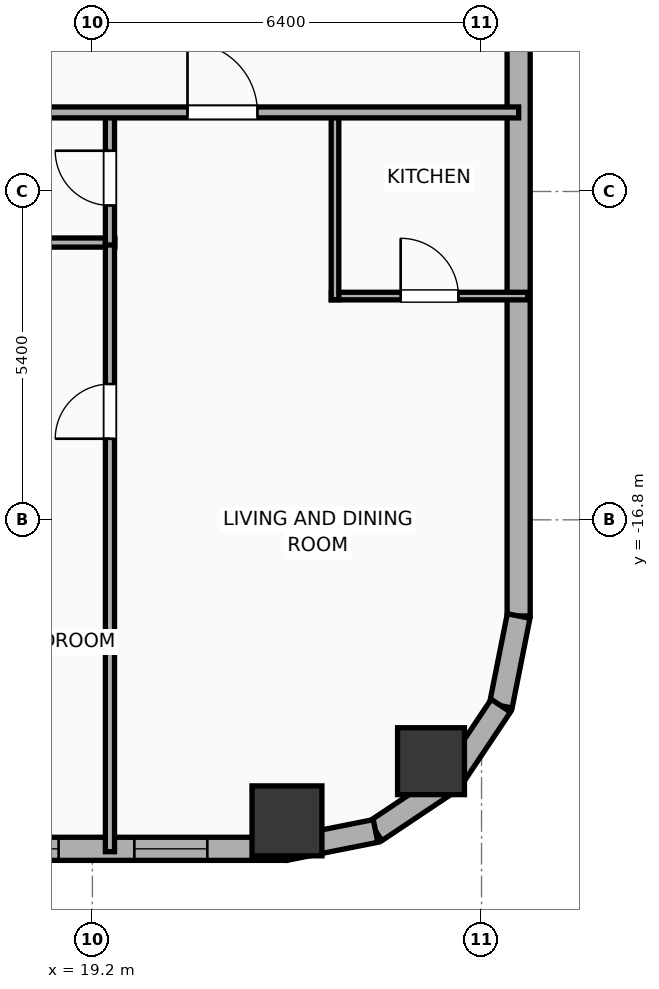
"""IFC4 building model, lengths in metres.
Left out: names, types, materials, properties, quantities, classifications, styles, units other than length and angle.
Written with IfcOpenShell. Run it as: python <this file> out.ifc"""

import sys

from ifc_helpers import new_model, si_unit, direction, frame, frame_2d, origin, origin_2d, place, context, subcontext, project, spatial, rectangle, hollow_rectangle, hollow_circle, extrude, element, fill, save


model = new_model("IFC4")
c1 = context("Model", 3, precision=1e-05, world=origin(), true_north=direction((0.0, 1.0)))
c2 = subcontext(c1, "Body", "Model", "MODEL_VIEW")
j1 = project(units=[si_unit("LENGTHUNIT", "METRE"), si_unit("PLANEANGLEUNIT", "RADIAN")], contexts=[c1])
p1 = place(None, origin())
s1 = spatial("IfcSite", under=j1, at=p1, CompositionType="ELEMENT")
p2 = place(p1, origin())
s2 = spatial("IfcBuilding", under=s1, at=p2, CompositionType="ELEMENT")
p3 = place(p2, frame((0.0, 0.0, 41.6)))
s3 = spatial("IfcBuildingStorey", under=s2, at=p3, CompositionType="ELEMENT", Elevation=41.6)
p4 = place(p3, frame((22.4, -21.75, 0.0), z_axis=(0.0, 0.0, 1.0), x_axis=(1.0, 0.0, 0.0)))
e1 = element("IfcColumn", 1, at=p4, inside=s3, PredefinedType="COLUMN", context=c2, shape_type="SweptSolid", body=[
    extrude(hollow_rectangle(XDim=1.15, YDim=1.15, WallThickness=0.04, at=origin_2d()), origin(), (0.0, 0.0, 1.0), 3.9),
])
p5 = place(p3, frame((24.769, -20.769, 0.0), z_axis=(0.0, 0.0, 1.0), x_axis=(1.0, 0.0, 0.0)))
e2 = element("IfcColumn", 2, at=p5, inside=s3, PredefinedType="COLUMN", context=c2, shape_type="SweptSolid", body=[
    extrude(hollow_circle(Radius=0.55, WallThickness=0.036, at=origin_2d()), origin(), (0.0, 0.0, 1.0), 3.9),
])
p6 = place(p3, frame((22.381, -22.21, 0.0), z_axis=(0.0, 0.0, 1.0), x_axis=(-1.0, 0.0, 0.0)))
e3 = element("IfcWall", 3, at=p6, inside=s3, PredefinedType="ELEMENTEDWALL", context=c2, shape_type="SweptSolid", body=[
    extrude(rectangle(XDim=51.963, YDim=0.38, at=frame_2d((25.981, 0.0))), origin(), (0.0, 0.0, 1.0), 3.65),
])
p7 = place(p6, frame((42.952, 0.0, 0.75)))
e4 = element("IfcOpeningElement", 4, at=p7, cuts=e3, PredefinedType="OPENING", context=c2, shape_type="SweptSolid", body=[
    extrude(rectangle(XDim=2.4, YDim=2.1, at=frame_2d((1.2, 1.05))), frame((0.0, 0.2, 0.0), z_axis=(0.0, -1.0, 0.0), x_axis=(1.0, 0.0, 0.0)), (0.0, 0.0, 1.0), 0.4),
])
p8 = place(p6, frame((49.847, 0.0, 0.75)))
e5 = element("IfcOpeningElement", 5, at=p8, cuts=e3, PredefinedType="OPENING", context=c2, shape_type="SweptSolid", body=[
    extrude(rectangle(XDim=1.2, YDim=2.05, at=frame_2d((0.6, 1.025))), frame((0.0, 0.2, 0.0), z_axis=(0.0, -1.0, 0.0), x_axis=(1.0, 0.0, 0.0)), (0.0, 0.0, 1.0), 0.4),
])
p9 = place(p6, frame((47.445, 0.0, 0.75)))
e6 = element("IfcOpeningElement", 6, at=p9, cuts=e3, PredefinedType="OPENING", context=c2, shape_type="SweptSolid", body=[
    extrude(rectangle(XDim=1.2, YDim=2.05, at=frame_2d((0.6, 1.025))), frame((0.0, 0.2, 0.0), z_axis=(0.0, -1.0, 0.0), x_axis=(1.0, 0.0, 0.0)), (0.0, 0.0, 1.0), 0.4),
])
p10 = place(p6, frame((39.526, 0.0, 0.75)))
e7 = element("IfcOpeningElement", 7, at=p10, cuts=e3, PredefinedType="OPENING", context=c2, shape_type="SweptSolid", body=[
    extrude(rectangle(XDim=1.2, YDim=2.05, at=frame_2d((0.6, 1.025))), frame((0.0, 0.2, 0.0), z_axis=(0.0, -1.0, 0.0), x_axis=(1.0, 0.0, 0.0)), (0.0, 0.0, 1.0), 0.4),
])
p11 = place(p6, frame((33.018, 0.0, 0.75)))
e8 = element("IfcOpeningElement", 8, at=p11, cuts=e3, PredefinedType="OPENING", context=c2, shape_type="SweptSolid", body=[
    extrude(rectangle(XDim=1.2, YDim=2.05, at=frame_2d((0.6, 1.025))), frame((0.0, 0.2, 0.0), z_axis=(0.0, -1.0, 0.0), x_axis=(1.0, 0.0, 0.0)), (0.0, 0.0, 1.0), 0.4),
])
p12 = place(p6, frame((36.813, 0.0, 0.75)))
e9 = element("IfcOpeningElement", 9, at=p12, cuts=e3, PredefinedType="OPENING", context=c2, shape_type="SweptSolid", body=[
    extrude(rectangle(XDim=1.2, YDim=2.05, at=frame_2d((0.6, 1.025))), frame((0.0, 0.2, 0.0), z_axis=(0.0, -1.0, 0.0), x_axis=(1.0, 0.0, 0.0)), (0.0, 0.0, 1.0), 0.4),
])
p13 = place(p6, frame((28.886, 0.0, 0.75)))
e10 = element("IfcOpeningElement", 10, at=p13, cuts=e3, PredefinedType="OPENING", context=c2, shape_type="SweptSolid", body=[
    extrude(rectangle(XDim=1.2, YDim=2.05, at=frame_2d((0.6, 1.025))), frame((0.0, 0.2, 0.0), z_axis=(0.0, -1.0, 0.0), x_axis=(1.0, 0.0, 0.0)), (0.0, 0.0, 1.0), 0.4),
])
p14 = place(p6, frame((23.306, 0.0, 0.75)))
e11 = element("IfcOpeningElement", 11, at=p14, cuts=e3, PredefinedType="OPENING", context=c2, shape_type="SweptSolid", body=[
    extrude(rectangle(XDim=1.2, YDim=2.05, at=frame_2d((0.6, 1.025))), frame((0.0, 0.2, 0.0), z_axis=(0.0, -1.0, 0.0), x_axis=(1.0, 0.0, 0.0)), (0.0, 0.0, 1.0), 0.4),
])
p15 = place(p6, frame((26.056, 0.0, 0.75)))
e12 = element("IfcOpeningElement", 12, at=p15, cuts=e3, PredefinedType="OPENING", context=c2, shape_type="SweptSolid", body=[
    extrude(rectangle(XDim=1.2, YDim=2.05, at=frame_2d((0.6, 1.025))), frame((0.0, 0.2, 0.0), z_axis=(0.0, -1.0, 0.0), x_axis=(1.0, 0.0, 0.0)), (0.0, 0.0, 1.0), 0.4),
])
p16 = place(p6, frame((18.811, 0.0, 0.75)))
e13 = element("IfcOpeningElement", 13, at=p16, cuts=e3, PredefinedType="OPENING", context=c2, shape_type="SweptSolid", body=[
    extrude(rectangle(XDim=1.2, YDim=2.05, at=frame_2d((0.6, 1.025))), frame((0.0, 0.2, 0.0), z_axis=(0.0, -1.0, 0.0), x_axis=(1.0, 0.0, 0.0)), (0.0, 0.0, 1.0), 0.4),
])
p17 = place(p6, frame((14.602, 0.0, 0.75)))
e14 = element("IfcOpeningElement", 14, at=p17, cuts=e3, PredefinedType="OPENING", context=c2, shape_type="SweptSolid", body=[
    extrude(rectangle(XDim=1.2, YDim=2.05, at=frame_2d((0.6, 1.025))), frame((0.0, 0.2, 0.0), z_axis=(0.0, -1.0, 0.0), x_axis=(1.0, 0.0, 0.0)), (0.0, 0.0, 1.0), 0.4),
])
p18 = place(p6, frame((11.852, 0.0, 0.75)))
e15 = element("IfcOpeningElement", 15, at=p18, cuts=e3, PredefinedType="OPENING", context=c2, shape_type="SweptSolid", body=[
    extrude(rectangle(XDim=1.2, YDim=2.05, at=frame_2d((0.6, 1.025))), frame((0.0, 0.2, 0.0), z_axis=(0.0, -1.0, 0.0), x_axis=(1.0, 0.0, 0.0)), (0.0, 0.0, 1.0), 0.4),
])
p19 = place(p6, frame((8.316, 0.0, 0.75)))
e16 = element("IfcOpeningElement", 16, at=p19, cuts=e3, PredefinedType="OPENING", context=c2, shape_type="SweptSolid", body=[
    extrude(rectangle(XDim=1.2, YDim=2.05, at=frame_2d((0.6, 1.025))), frame((0.0, 0.2, 0.0), z_axis=(0.0, -1.0, 0.0), x_axis=(1.0, 0.0, 0.0)), (0.0, 0.0, 1.0), 0.4),
])
p20 = place(p6, frame((6.286, 0.0, 0.75)))
e17 = element("IfcOpeningElement", 17, at=p20, cuts=e3, PredefinedType="OPENING", context=c2, shape_type="SweptSolid", body=[
    extrude(rectangle(XDim=1.2, YDim=2.05, at=frame_2d((0.6, 1.025))), frame((0.0, 0.2, 0.0), z_axis=(0.0, -1.0, 0.0), x_axis=(1.0, 0.0, 0.0)), (0.0, 0.0, 1.0), 0.4),
])
p21 = place(p6, frame((3.737, 0.0, 0.75)))
e18 = element("IfcOpeningElement", 18, at=p21, cuts=e3, PredefinedType="OPENING", context=c2, shape_type="SweptSolid", body=[
    extrude(rectangle(XDim=1.2, YDim=2.05, at=frame_2d((0.6, 1.025))), frame((0.0, 0.2, 0.0), z_axis=(0.0, -1.0, 0.0), x_axis=(1.0, 0.0, 0.0)), (0.0, 0.0, 1.0), 0.4),
])
p22 = place(p6, frame((1.291, 0.0, 0.75)))
e19 = element("IfcOpeningElement", 19, at=p22, cuts=e3, PredefinedType="OPENING", context=c2, shape_type="SweptSolid", body=[
    extrude(rectangle(XDim=1.2, YDim=2.05, at=frame_2d((0.6, 1.025))), frame((0.0, 0.2, 0.0), z_axis=(0.0, -1.0, 0.0), x_axis=(1.0, 0.0, 0.0)), (0.0, 0.0, 1.0), 0.4),
])
p23 = place(p3, frame((26.21, 18.381, 0.0), z_axis=(0.0, 0.0, 1.0), x_axis=(0.0, -1.0, 0.0)))
e20 = element("IfcWall", 20, at=p23, inside=s3, PredefinedType="ELEMENTEDWALL", context=c2, shape_type="SweptSolid", body=[
    extrude(rectangle(XDim=36.763, YDim=0.38, at=frame_2d((18.381, 0.0))), origin(), (0.0, 0.0, 1.0), 3.65),
])
p24 = place(p3, frame((26.21, -18.381, 0.0), z_axis=(0.0, 0.0, 1.0), x_axis=(-0.195086038585, -0.980786132421, 0.0)))
e21 = element("IfcWall", 21, at=p24, inside=s3, PredefinedType="ELEMENTEDWALL", context=c2, shape_type="SweptSolid", body=[
    extrude(rectangle(XDim=1.504, YDim=0.38, at=frame_2d((0.752, 0.0))), origin(), (0.0, 0.0, 1.0), 3.65),
])
for number, where, z_axis, x_axis in (
    (22, (25.917, -19.857, 0.0), (0.0, 0.0, 1.0), (-0.556, -0.831, 0.0)),
    (23, (25.091, -21.091, 0.0), (0.0, 0.0, 1.0), (-0.831, -0.556, 0.0)),
):
    element("IfcWall", number, at=place(p3, frame(where, z_axis=z_axis, x_axis=x_axis)), inside=s3, PredefinedType="ELEMENTEDWALL", context=c2, shape_type="SweptSolid", body=[
        extrude(rectangle(XDim=1.485, YDim=0.38, at=frame_2d((0.743, 0.0))), origin(), (0.0, 0.0, 1.0), 3.65),
    ])
p25 = place(p3, frame((23.857, -21.917, 0.0), z_axis=(0.0, 0.0, 1.0), x_axis=(-0.980786132421, -0.195086038585, 0.0)))
e24 = element("IfcWall", 24, at=p25, inside=s3, PredefinedType="ELEMENTEDWALL", context=c2, shape_type="SweptSolid", body=[
    extrude(rectangle(XDim=1.504, YDim=0.38, at=frame_2d((0.752, 0.0))), origin(), (0.0, 0.0, 1.0), 3.65),
])
p26 = place(p3, frame((16.34, -12.24, 0.0), z_axis=(0.0, 0.0, 1.0), x_axis=(1.0, 0.0, 0.0)))
e25 = element("IfcWall", 25, at=p26, inside=s3, PredefinedType="PLUMBINGWALL", context=c2, shape_type="SweptSolid", body=[
    extrude(rectangle(XDim=3.229, YDim=0.15, at=frame_2d((1.615, 0.0))), origin(), (0.0, 0.0, 1.0), 3.65),
])
p27 = place(p3, frame((19.489, -22.258, 0.0), z_axis=(0.0, 0.0, 1.0), x_axis=(0.0, 1.0, 0.0)))
e26 = element("IfcWall", 26, at=p27, inside=s3, PredefinedType="PLUMBINGWALL", context=c2, shape_type="SweptSolid", body=[
    extrude(rectangle(XDim=10.058, YDim=0.15, at=frame_2d((5.029, 0.0))), origin(), (0.0, 0.0, 1.0), 3.65),
])
p28 = place(p27, frame((6.792, 0.0, 0.0)))
e27 = element("IfcOpeningElement", 27, at=p28, cuts=e26, PredefinedType="OPENING", context=c2, shape_type="SweptSolid", body=[
    extrude(rectangle(XDim=0.9, YDim=2.05, at=frame_2d((0.45, 1.025))), frame((0.0, 0.085, 0.0), z_axis=(0.0, -1.0, 0.0), x_axis=(1.0, 0.0, 0.0)), (0.0, 0.0, 1.0), 0.17),
])
p29 = place(p3, frame((19.489, -12.28, 0.0), z_axis=(0.0, 0.0, 1.0), x_axis=(0.0, 1.0, 0.0)))
e28 = element("IfcWall", 28, at=p29, inside=s3, PredefinedType="PLUMBINGWALL", context=c2, shape_type="SweptSolid", body=[
    extrude(rectangle(XDim=2.2, YDim=0.15, at=frame_2d((1.1, 0.0))), origin(), (0.0, 0.0, 1.0), 3.65),
])
p30 = place(p29, frame((0.65, 0.0, 0.0)))
e29 = element("IfcOpeningElement", 29, at=p30, cuts=e28, PredefinedType="OPENING", context=c2, shape_type="SweptSolid", body=[
    extrude(rectangle(XDim=0.9, YDim=2.05, at=frame_2d((0.45, 1.025))), frame((0.0, 0.085, 0.0), z_axis=(0.0, -1.0, 0.0), x_axis=(1.0, 0.0, 0.0)), (0.0, 0.0, 1.0), 0.17),
])
p31 = place(p3, frame((23.13, -13.12, 0.0), z_axis=(0.0, 0.0, 1.0), x_axis=(1.0, 0.0, 0.0)))
e30 = element("IfcWall", 30, at=p31, inside=s3, PredefinedType="PARTITIONING", context=c2, shape_type="SweptSolid", body=[
    extrude(rectangle(XDim=3.23, YDim=0.125, at=frame_2d((1.615, 0.0))), origin(), (0.0, 0.0, 1.0), 3.65),
])
p32 = place(p31, frame((1.14, 0.0, 0.0)))
e31 = element("IfcOpeningElement", 31, at=p32, cuts=e30, PredefinedType="OPENING", context=c2, shape_type="SweptSolid", body=[
    extrude(rectangle(XDim=0.95, YDim=2.05, at=frame_2d((0.475, 1.025))), frame((0.0, 0.073, 0.0), z_axis=(0.0, -1.0, 0.0), x_axis=(1.0, 0.0, 0.0)), (0.0, 0.0, 1.0), 0.145),
])
p33 = place(p3, frame((23.19, -13.18, 0.0), z_axis=(0.0, 0.0, 1.0), x_axis=(0.0, 1.0, 0.0)))
e32 = element("IfcWall", 32, at=p33, inside=s3, PredefinedType="PARTITIONING", context=c2, shape_type="SweptSolid", body=[
    extrude(rectangle(XDim=3.1, YDim=0.125, at=frame_2d((1.55, 0.0))), origin(), (0.0, 0.0, 1.0), 3.65),
])
p34 = place(p3, frame((-33.41, -10.1, 0.0), z_axis=(0.0, 0.0, 1.0), x_axis=(1.0, 0.0, 0.0)))
e33 = element("IfcWall", 33, at=p34, inside=s3, PredefinedType="PARTITIONING", context=c2, shape_type="SweptSolid", body=[
    extrude(rectangle(XDim=59.62, YDim=0.18, at=frame_2d((29.81, 0.0))), origin(), (0.0, 0.0, 1.0), 3.65),
])
p35 = place(p34, frame((2.746, 0.0, 0.0)))
e34 = element("IfcOpeningElement", 34, at=p35, cuts=e33, PredefinedType="OPENING", context=c2, shape_type="SweptSolid", body=[
    extrude(rectangle(XDim=0.9, YDim=2.05, at=frame_2d((0.45, 1.025))), frame((0.0, 0.1, 0.0), z_axis=(0.0, -1.0, 0.0), x_axis=(1.0, 0.0, 0.0)), (0.0, 0.0, 1.0), 0.2),
])
p36 = place(p34, frame((11.552, 0.0, 0.0)))
e35 = element("IfcOpeningElement", 35, at=p36, cuts=e33, PredefinedType="OPENING", context=c2, shape_type="SweptSolid", body=[
    extrude(rectangle(XDim=1.15, YDim=2.05, at=frame_2d((0.575, 1.025))), frame((0.0, 0.1, 0.0), z_axis=(0.0, -1.0, 0.0), x_axis=(1.0, 0.0, 0.0)), (0.0, 0.0, 1.0), 0.2),
])
p37 = place(p34, frame((22.379, 0.0, 0.0)))
e36 = element("IfcOpeningElement", 36, at=p37, cuts=e33, PredefinedType="OPENING", context=c2, shape_type="SweptSolid", body=[
    extrude(rectangle(XDim=1.15, YDim=2.05, at=frame_2d((0.575, 1.025))), frame((0.0, 0.1, 0.0), z_axis=(0.0, -1.0, 0.0), x_axis=(1.0, 0.0, 0.0)), (0.0, 0.0, 1.0), 0.2),
])
p38 = place(p34, frame((31.28, 0.0, 0.0)))
e37 = element("IfcOpeningElement", 37, at=p38, cuts=e33, PredefinedType="OPENING", context=c2, shape_type="SweptSolid", body=[
    extrude(rectangle(XDim=1.15, YDim=2.05, at=frame_2d((0.575, 1.025))), frame((0.0, 0.1, 0.0), z_axis=(0.0, -1.0, 0.0), x_axis=(1.0, 0.0, 0.0)), (0.0, 0.0, 1.0), 0.2),
])
p39 = place(p34, frame((36.02, 0.0, 0.0)))
e38 = element("IfcOpeningElement", 38, at=p39, cuts=e33, PredefinedType="OPENING", context=c2, shape_type="SweptSolid", body=[
    extrude(rectangle(XDim=0.9, YDim=2.05, at=frame_2d((0.45, 1.025))), frame((0.0, 0.1, 0.0), z_axis=(0.0, -1.0, 0.0), x_axis=(1.0, 0.0, 0.0)), (0.0, 0.0, 1.0), 0.2),
])
p40 = place(p34, frame((40.044, 0.0, 0.0)))
e39 = element("IfcOpeningElement", 39, at=p40, cuts=e33, PredefinedType="OPENING", context=c2, shape_type="SweptSolid", body=[
    extrude(rectangle(XDim=1.15, YDim=2.05, at=frame_2d((0.575, 1.025))), frame((0.0, 0.1, 0.0), z_axis=(0.0, -1.0, 0.0), x_axis=(1.0, 0.0, 0.0)), (0.0, 0.0, 1.0), 0.2),
])
p41 = place(p34, frame((45.613, 0.0, 0.0)))
e40 = element("IfcOpeningElement", 40, at=p41, cuts=e33, PredefinedType="OPENING", context=c2, shape_type="SweptSolid", body=[
    extrude(rectangle(XDim=1.15, YDim=2.05, at=frame_2d((0.575, 1.025))), frame((0.0, 0.1, 0.0), z_axis=(0.0, -1.0, 0.0), x_axis=(1.0, 0.0, 0.0)), (0.0, 0.0, 1.0), 0.2),
])
p42 = place(p34, frame((54.174, 0.0, 0.0)))
e41 = element("IfcOpeningElement", 41, at=p42, cuts=e33, PredefinedType="OPENING", context=c2, shape_type="SweptSolid", body=[
    extrude(rectangle(XDim=1.15, YDim=2.05, at=frame_2d((0.575, 1.025))), frame((0.0, 0.1, 0.0), z_axis=(0.0, -1.0, 0.0), x_axis=(1.0, 0.0, 0.0)), (0.0, 0.0, 1.0), 0.2),
])
p43 = place(p21, origin())
e42 = element("IfcWindow", 42, at=p43, inside=s3, PartitioningType="SINGLE_PANEL", PredefinedType="WINDOW", context=c2, shape_type="SweptSolid", body=[
    extrude(rectangle(XDim=1.2, YDim=2.05, at=frame_2d((0.6, 1.025))), frame((0.0, 0.03, 0.0), z_axis=(0.0, -1.0, 0.0), x_axis=(1.0, 0.0, 0.0)), (0.0, 0.0, 1.0), 0.06),
])
fill(e18, e42)
p44 = place(p22, origin())
e43 = element("IfcWindow", 43, at=p44, inside=s3, PartitioningType="SINGLE_PANEL", PredefinedType="WINDOW", context=c2, shape_type="SweptSolid", body=[
    extrude(rectangle(XDim=1.2, YDim=2.05, at=frame_2d((0.6, 1.025))), frame((0.0, 0.03, 0.0), z_axis=(0.0, -1.0, 0.0), x_axis=(1.0, 0.0, 0.0)), (0.0, 0.0, 1.0), 0.06),
])
fill(e19, e43)
p45 = place(p28, origin())
e44 = element("IfcDoor", 44, at=p45, inside=s3, OperationType="SINGLE_SWING_LEFT", PredefinedType="DOOR", context=c2, shape_type="SweptSolid", body=[
    extrude(rectangle(XDim=0.9, YDim=2.05, at=frame_2d((0.45, 1.025))), frame((0.0, 0.025, 0.0), z_axis=(0.0, -1.0, 0.0), x_axis=(1.0, 0.0, 0.0)), (0.0, 0.0, 1.0), 0.05),
])
fill(e27, e44)
p46 = place(p30, origin())
e45 = element("IfcDoor", 45, at=p46, inside=s3, OperationType="SINGLE_SWING_RIGHT", PredefinedType="DOOR", context=c2, shape_type="SweptSolid", body=[
    extrude(rectangle(XDim=0.9, YDim=2.05, at=frame_2d((0.45, 1.025))), frame((0.0, 0.025, 0.0), z_axis=(0.0, -1.0, 0.0), x_axis=(1.0, 0.0, 0.0)), (0.0, 0.0, 1.0), 0.05),
])
fill(e29, e45)
p47 = place(p32, origin())
e46 = element("IfcDoor", 46, at=p47, inside=s3, OperationType="SINGLE_SWING_LEFT", PredefinedType="DOOR", context=c2, shape_type="SweptSolid", body=[
    extrude(rectangle(XDim=0.95, YDim=2.05, at=frame_2d((0.475, 1.025))), frame((0.0, 0.025, 0.0), z_axis=(0.0, -1.0, 0.0), x_axis=(1.0, 0.0, 0.0)), (0.0, 0.0, 1.0), 0.05),
])
fill(e31, e46)
p48 = place(p42, origin())
e47 = element("IfcDoor", 47, at=p48, inside=s3, OperationType="SINGLE_SWING_LEFT", PredefinedType="DOOR", context=c2, shape_type="SweptSolid", body=[
    extrude(rectangle(XDim=1.15, YDim=2.05, at=frame_2d((0.575, 1.025))), frame((0.0, 0.025, 0.0), z_axis=(0.0, -1.0, 0.0), x_axis=(1.0, 0.0, 0.0)), (0.0, 0.0, 1.0), 0.05),
])
fill(e41, e47)
save(model, sys.argv[1])
